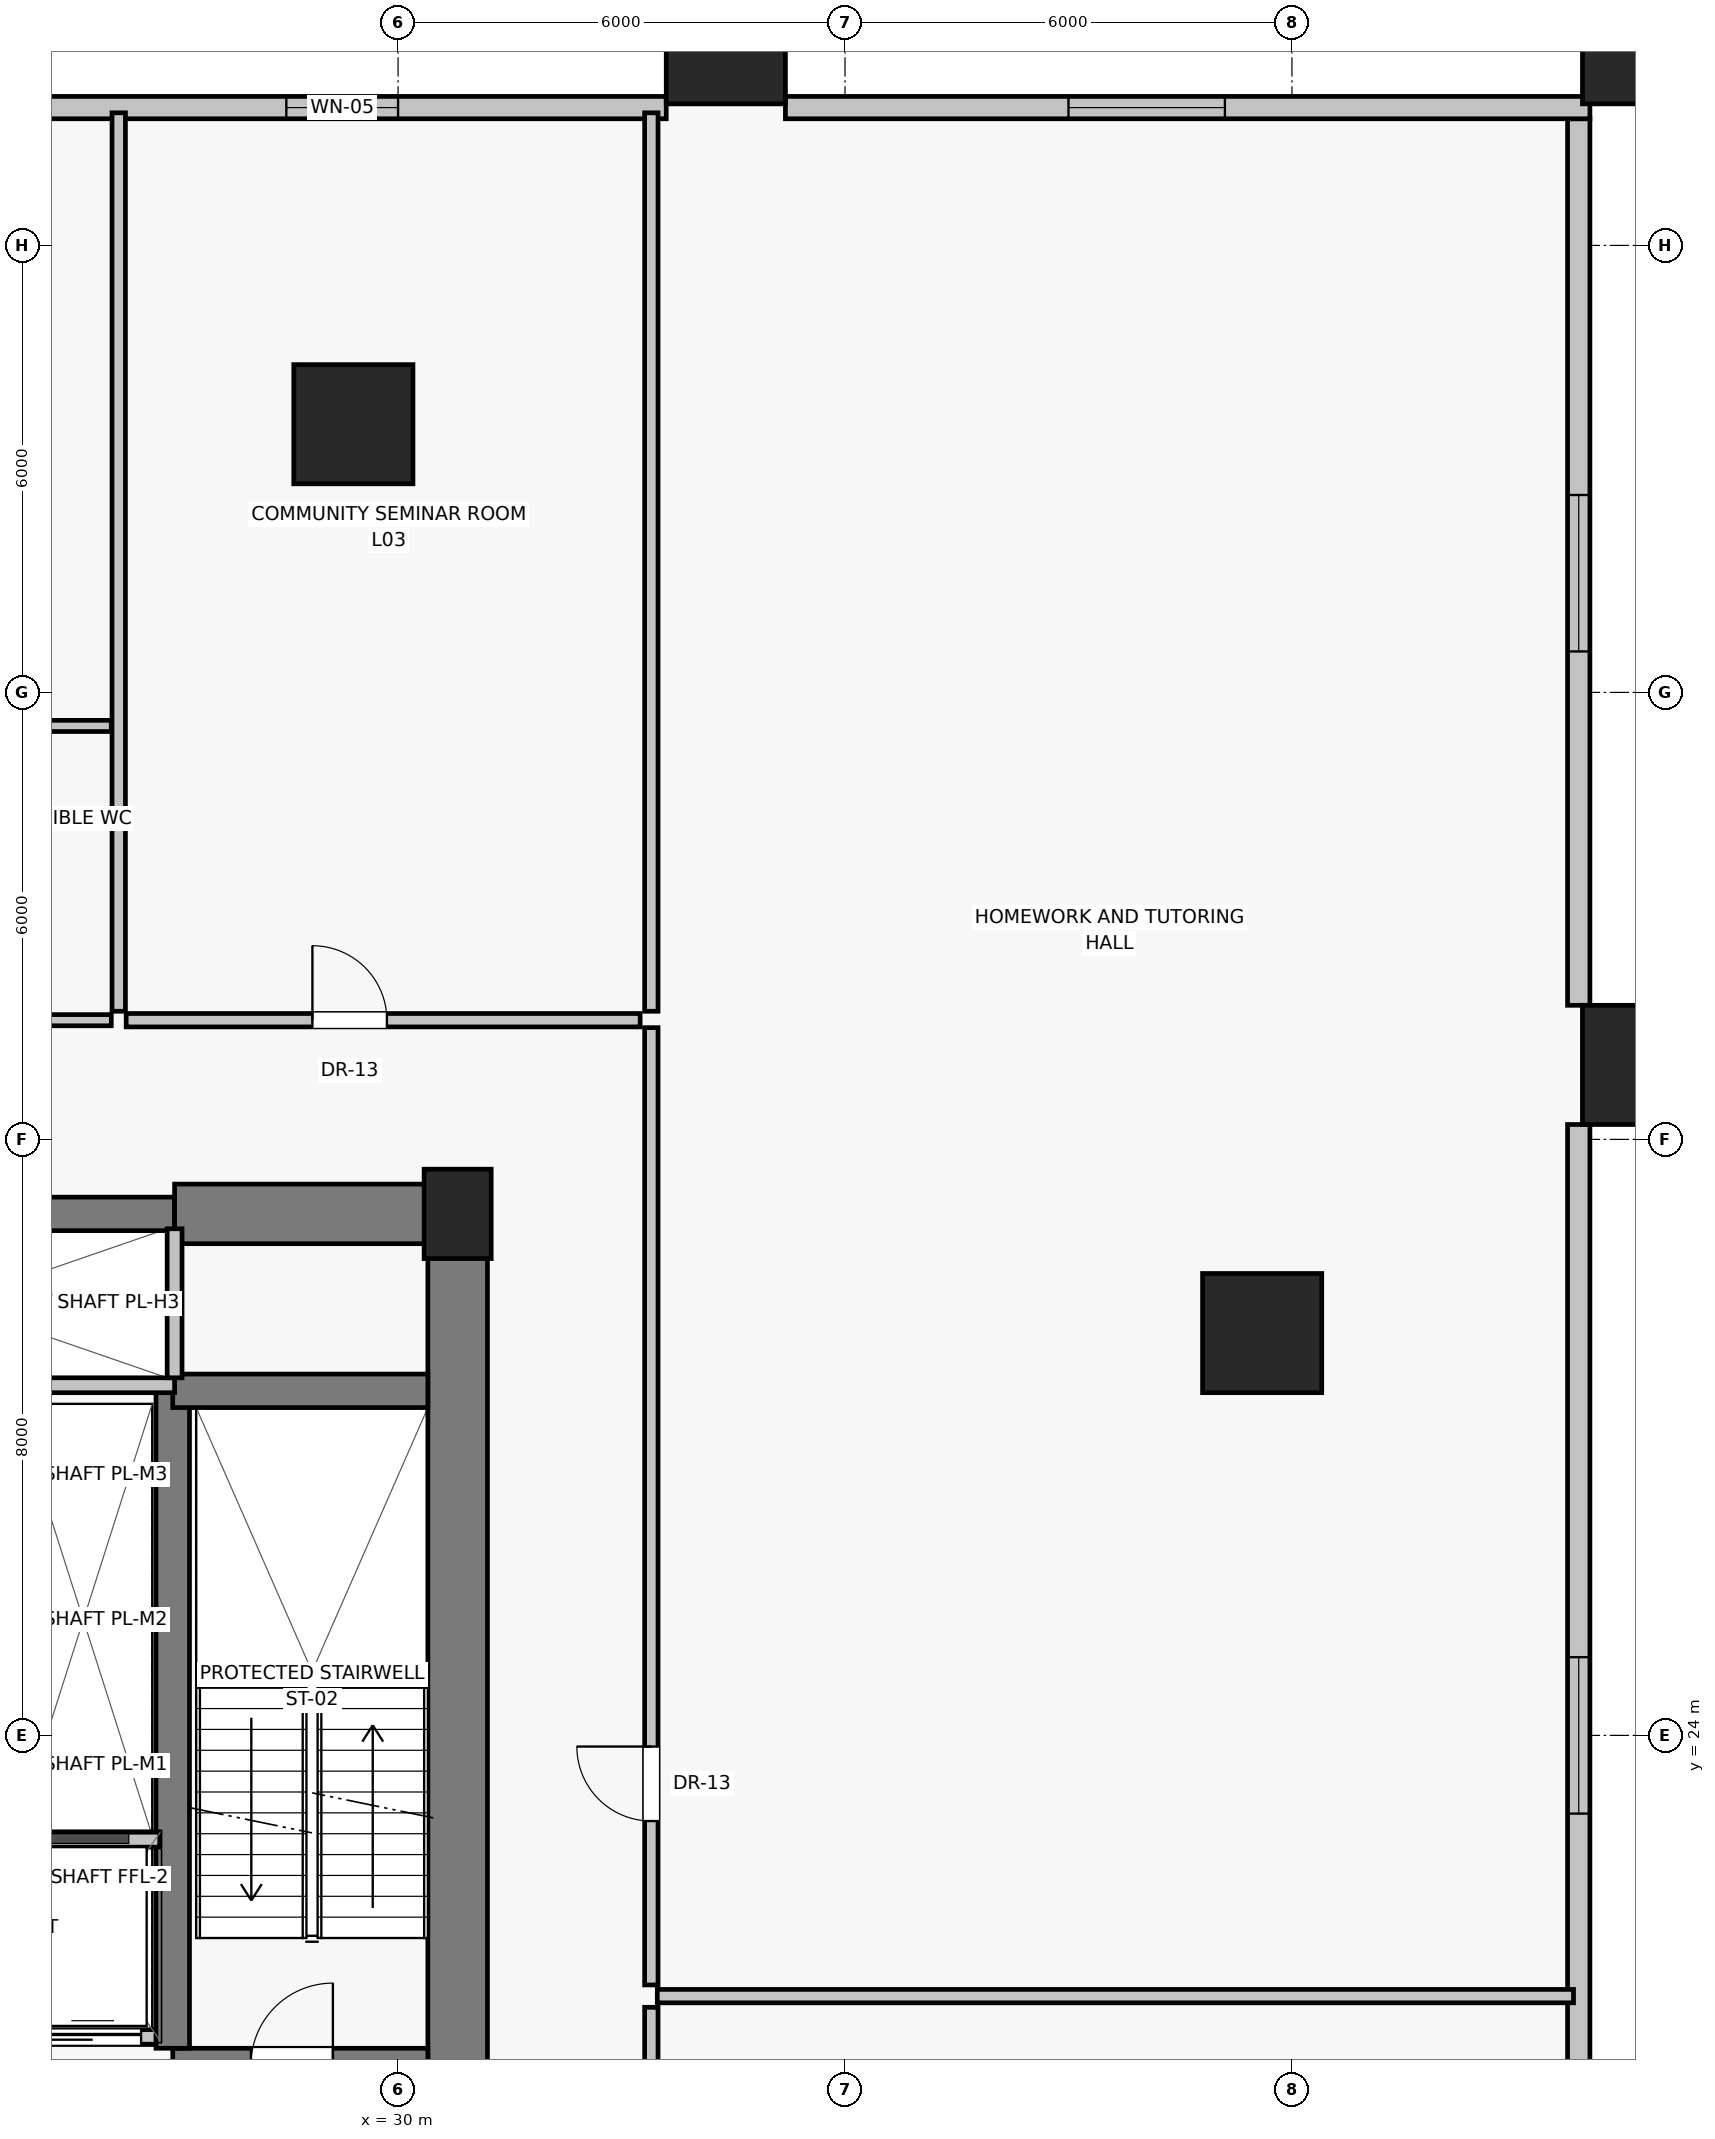
"""IFC4 building model, lengths in metres.
Left out: names, types, materials, properties, quantities, classifications, styles, units other than length and angle.
Written with IfcOpenShell. Run it as: python <this file> out.ifc"""

import sys

from ifc_helpers import new_model, si_unit, direction, frame, frame_2d, origin, origin_2d, place, context, subcontext, project, spatial, rectangle, extrude, source, transform, mapped, element, fill, save


model = new_model("IFC4")
c1 = context("Model", 3, precision=1e-05, world=origin(), true_north=direction((0.0, 1.0)))
c2 = subcontext(c1, "Body", "Model", "MODEL_VIEW")
j1 = project(units=[si_unit("LENGTHUNIT", "METRE"), si_unit("PLANEANGLEUNIT", "RADIAN")], contexts=[c1])
p1 = place(None, origin())
s1 = spatial("IfcSite", under=j1, at=p1, CompositionType="ELEMENT")
p2 = place(p1, origin())
s2 = spatial("IfcBuilding", under=s1, at=p2, CompositionType="ELEMENT")
p3 = place(p2, frame((0.0, 0.0, 14.0)))
s3 = spatial("IfcBuildingStorey", under=s2, at=p3, CompositionType="ELEMENT", Elevation=14.0)
p4 = place(p3, frame((30.8, 31.0, 0.0), z_axis=(0.0, 0.0, 1.0), x_axis=(1.0, 0.0, 0.0)))
e1 = element("IfcColumn", 1, at=p4, inside=s3, PredefinedType="PILASTER", context=c2, shape_type="SweptSolid", body=[
    extrude(rectangle(XDim=0.9, YDim=1.2, at=origin_2d()), origin(), (0.0, 0.0, 1.0), 4.4),
])
for number, where, z_axis, x_axis in (
    (2, (46.7, 33.0, 0.0), (0.0, 0.0, 1.0), (1.0, 0.0, 0.0)),
    (3, (34.4, 46.7, 0.0), (0.0, 0.0, 1.0), (1.0, 0.0, 0.0)),
    (4, (46.7, 46.7, 0.0), (0.0, 0.0, 1.0), (1.0, 0.0, 0.0)),
    (5, (41.6, 29.4, 0.0), (0.0, 0.0, 1.0), (1.0, 0.0, 0.0)),
    (6, (29.4, 41.6, 0.0), (0.0, 0.0, 1.0), (1.0, 0.0, 0.0)),
):
    element("IfcColumn", number, at=place(p3, frame(where, z_axis=z_axis, x_axis=x_axis)), inside=s3, PredefinedType="COLUMN", context=c2, shape_type="SweptSolid", body=[
        extrude(rectangle(XDim=1.6, YDim=1.6, at=origin_2d()), origin(), (0.0, 0.0, 1.0), 4.4),
    ])
p5 = place(p3, frame((45.85, 15.8, 0.0), z_axis=(0.0, 0.0, 1.0), x_axis=(0.0, 1.0, 0.0)))
e7 = element("IfcWall", 7, at=p5, inside=s3, PredefinedType="SOLIDWALL", context=c2, shape_type="SweptSolid", body=[
    extrude(rectangle(XDim=16.4, YDim=0.3, at=frame_2d((8.2, 0.0))), origin(), (0.0, 0.0, 1.0), 3.0),
])
p6 = place(p5, frame((7.15, 0.0, 0.85)))
e8 = element("IfcOpeningElement", 8, at=p6, cuts=e7, PredefinedType="OPENING", context=c2, shape_type="SweptSolid", body=[
    extrude(rectangle(XDim=2.1, YDim=1.75, at=frame_2d((1.05, 0.875))), frame((0.0, 0.16, 0.0), z_axis=(0.0, -1.0, 0.0), x_axis=(1.0, 0.0, 0.0)), (0.0, 0.0, 1.0), 0.32),
])
p7 = place(p3, frame((45.85, 33.8, 0.0), z_axis=(0.0, 0.0, 1.0), x_axis=(0.0, 1.0, 0.0)))
e9 = element("IfcWall", 9, at=p7, inside=s3, PredefinedType="SOLIDWALL", context=c2, shape_type="SweptSolid", body=[
    extrude(rectangle(XDim=11.9, YDim=0.3, at=frame_2d((5.95, 0.0))), origin(), (0.0, 0.0, 1.0), 3.0),
])
p8 = place(p7, frame((4.75, 0.0, 0.85)))
e10 = element("IfcOpeningElement", 10, at=p8, cuts=e9, PredefinedType="OPENING", context=c2, shape_type="SweptSolid", body=[
    extrude(rectangle(XDim=2.1, YDim=1.75, at=frame_2d((1.05, 0.875))), frame((0.0, 0.16, 0.0), z_axis=(0.0, -1.0, 0.0), x_axis=(1.0, 0.0, 0.0)), (0.0, 0.0, 1.0), 0.32),
])
p9 = place(p3, frame((46.0, 45.85, 0.0), z_axis=(0.0, 0.0, 1.0), x_axis=(-1.0, 0.0, 0.0)))
e11 = element("IfcWall", 11, at=p9, inside=s3, PredefinedType="SOLIDWALL", context=c2, shape_type="SweptSolid", body=[
    extrude(rectangle(XDim=10.8, YDim=0.3, at=frame_2d((5.4, 0.0))), origin(), (0.0, 0.0, 1.0), 3.0),
])
p10 = place(p9, frame((4.9, 0.0, 0.85)))
e12 = element("IfcOpeningElement", 12, at=p10, cuts=e11, PredefinedType="OPENING", context=c2, shape_type="SweptSolid", body=[
    extrude(rectangle(XDim=2.1, YDim=1.75, at=frame_2d((1.05, 0.875))), frame((0.0, 0.16, 0.0), z_axis=(0.0, -1.0, 0.0), x_axis=(1.0, 0.0, 0.0)), (0.0, 0.0, 1.0), 0.32),
])
p11 = place(p3, frame((33.6, 45.85, 0.0), z_axis=(0.0, 0.0, 1.0), x_axis=(-1.0, 0.0, 0.0)))
e13 = element("IfcWall", 13, at=p11, inside=s3, PredefinedType="SOLIDWALL", context=c2, shape_type="SweptSolid", body=[
    extrude(rectangle(XDim=8.8, YDim=0.3, at=frame_2d((4.4, 0.0))), origin(), (0.0, 0.0, 1.0), 3.0),
])
p12 = place(p11, frame((3.6, 0.0, 0.85)))
e14 = element("IfcOpeningElement", 14, at=p12, cuts=e13, PredefinedType="OPENING", context=c2, shape_type="SweptSolid", body=[
    extrude(rectangle(XDim=1.5, YDim=1.6, at=frame_2d((0.75, 0.8))), frame((0.0, 0.16, 0.0), z_axis=(0.0, -1.0, 0.0), x_axis=(1.0, 0.0, 0.0)), (0.0, 0.0, 1.0), 0.32),
])
p13 = place(p3, frame((30.8, 16.8, 0.0), z_axis=(0.0, 0.0, 1.0), x_axis=(0.0, 1.0, 0.0)))
e15 = element("IfcWall", 15, at=p13, inside=s3, PredefinedType="SHEAR", context=c2, shape_type="SweptSolid", body=[
    extrude(rectangle(XDim=14.2, YDim=0.8, at=frame_2d((7.1, 0.0))), origin(), (0.0, 0.0, 1.0), 4.1),
])
p14 = place(p3, frame((21.0, 31.0, 0.0), z_axis=(0.0, 0.0, 1.0), x_axis=(1.0, 0.0, 0.0)))
e16 = element("IfcWall", 16, at=p14, inside=s3, PredefinedType="SHEAR", context=c2, shape_type="SweptSolid", body=[
    extrude(rectangle(XDim=6.0, YDim=0.45, at=frame_2d((3.0, 0.0))), origin(), (0.0, 0.0, 1.0), 4.1),
])
p15 = place(p3, frame((27.0, 31.0, 0.0), z_axis=(0.0, 0.0, 1.0), x_axis=(1.0, 0.0, 0.0)))
e17 = element("IfcWall", 17, at=p15, inside=s3, PredefinedType="SHEAR", context=c2, shape_type="SweptSolid", body=[
    extrude(rectangle(XDim=3.8, YDim=0.8, at=frame_2d((1.9, 0.0))), origin(), (0.0, 0.0, 1.0), 4.1),
])
p16 = place(p3, frame((24.95, 19.95, 0.0), z_axis=(0.0, 0.0, 1.0), x_axis=(1.0, 0.0, 0.0)))
e18 = element("IfcWall", 18, at=p16, inside=s3, PredefinedType="SOLIDWALL", context=c2, shape_type="SweptSolid", body=[
    extrude(rectangle(XDim=1.85, YDim=0.2, at=frame_2d((0.925, 0.0))), origin(), (0.0, 0.0, 1.0), 4.1),
])
p17 = place(p16, frame((0.3, 0.0, 0.0)))
e19 = element("IfcOpeningElement", 19, at=p17, cuts=e18, PredefinedType="OPENING", context=c2, shape_type="SweptSolid", body=[
    extrude(rectangle(XDim=1.3, YDim=2.25, at=frame_2d((0.65, 1.125))), frame((0.0, 0.11, 0.0), z_axis=(0.0, -1.0, 0.0), x_axis=(1.0, 0.0, 0.0)), (0.0, 0.0, 1.0), 0.22),
])
p18 = place(p3, frame((26.975, 19.575, 0.0), z_axis=(0.0, 0.0, 1.0), x_axis=(1.0, 0.0, 0.0)))
e20 = element("IfcWall", 20, at=p18, inside=s3, PredefinedType="SHEAR", context=c2, shape_type="SweptSolid", body=[
    extrude(rectangle(XDim=3.425, YDim=0.45, at=frame_2d((1.712, 0.0))), origin(), (0.0, 0.0, 1.0), 4.1),
])
p19 = place(p18, frame((1.05, 0.0, 0.0)))
e21 = element("IfcOpeningElement", 21, at=p19, cuts=e20, PredefinedType="OPENING", context=c2, shape_type="SweptSolid", body=[
    extrude(rectangle(XDim=1.1, YDim=2.03, at=frame_2d((0.55, 1.015))), frame((0.0, 0.235, 0.0), z_axis=(0.0, -1.0, 0.0), x_axis=(1.0, 0.0, 0.0)), (0.0, 0.0, 1.0), 0.47),
])
p20 = place(p3, frame((26.975, 19.8, 0.0), z_axis=(0.0, 0.0, 1.0), x_axis=(0.0, 1.0, 0.0)))
e22 = element("IfcWall", 22, at=p20, inside=s3, PredefinedType="SHEAR", context=c2, shape_type="SweptSolid", body=[
    extrude(rectangle(XDim=8.825, YDim=0.45, at=frame_2d((4.413, 0.0))), origin(), (0.0, 0.0, 1.0), 4.1),
])
p21 = place(p3, frame((26.975, 28.625, 0.0), z_axis=(0.0, 0.0, 1.0), x_axis=(1.0, 0.0, 0.0)))
e23 = element("IfcWall", 23, at=p21, inside=s3, PredefinedType="SHEAR", context=c2, shape_type="SweptSolid", body=[
    extrude(rectangle(XDim=3.425, YDim=0.45, at=frame_2d((1.712, 0.0))), origin(), (0.0, 0.0, 1.0), 4.1),
])
p22 = place(p3, frame((24.85, 22.6, 0.0), z_axis=(0.0, 0.0, 1.0), x_axis=(1.0, 0.0, 0.0)))
e24 = element("IfcWall", 24, at=p22, inside=s3, PredefinedType="SOLIDWALL", context=c2, shape_type="SweptSolid", body=[
    extrude(rectangle(XDim=1.95, YDim=0.2, at=frame_2d((0.975, 0.0))), origin(), (0.0, 0.0, 1.0), 4.1),
])
p23 = place(p3, frame((21.0, 28.7, 0.0), z_axis=(0.0, 0.0, 1.0), x_axis=(1.0, 0.0, 0.0)))
e25 = element("IfcWall", 25, at=p23, inside=s3, PredefinedType="SOLIDWALL", context=c2, shape_type="SweptSolid", body=[
    extrude(rectangle(XDim=6.0, YDim=0.2, at=frame_2d((3.0, 0.0))), origin(), (0.0, 0.0, 1.0), 4.1),
])
p24 = place(p3, frame((27.0, 28.8, 0.0), z_axis=(0.0, 0.0, 1.0), x_axis=(0.0, 1.0, 0.0)))
e26 = element("IfcWall", 26, at=p24, inside=s3, PredefinedType="SOLIDWALL", context=c2, shape_type="SweptSolid", body=[
    extrude(rectangle(XDim=2.0, YDim=0.2, at=frame_2d((1.0, 0.0))), origin(), (0.0, 0.0, 1.0), 4.1),
])
p25 = place(p3, frame((33.4, 14.3, 0.0), z_axis=(0.0, 0.0, 1.0), x_axis=(0.0, 1.0, 0.0)))
e27 = element("IfcWall", 27, at=p25, inside=s3, PredefinedType="PARTITIONING", context=c2, shape_type="SweptSolid", body=[
    extrude(rectangle(XDim=6.05, YDim=0.18, at=frame_2d((3.025, 0.0))), origin(), (0.0, 0.0, 1.0), 4.1),
])
p26 = place(p25, frame((2.2, 0.0, 0.0)))
e28 = element("IfcOpeningElement", 28, at=p26, cuts=e27, PredefinedType="OPENING", context=c2, shape_type="SweptSolid", body=[
    extrude(rectangle(XDim=1.0, YDim=2.01, at=frame_2d((0.5, 1.005))), frame((0.0, 0.1, 0.0), z_axis=(0.0, -1.0, 0.0), x_axis=(1.0, 0.0, 0.0)), (0.0, 0.0, 1.0), 0.2),
])
p27 = place(p3, frame((33.4, 20.65, 0.0), z_axis=(0.0, 0.0, 1.0), x_axis=(0.0, 1.0, 0.0)))
e29 = element("IfcWall", 29, at=p27, inside=s3, PredefinedType="PARTITIONING", context=c2, shape_type="SweptSolid", body=[
    extrude(rectangle(XDim=12.85, YDim=0.18, at=frame_2d((6.425, 0.0))), origin(), (0.0, 0.0, 1.0), 4.1),
])
p28 = place(p27, frame((2.2, 0.0, 0.0)))
e30 = element("IfcOpeningElement", 30, at=p28, cuts=e29, PredefinedType="OPENING", context=c2, shape_type="SweptSolid", body=[
    extrude(rectangle(XDim=1.0, YDim=2.01, at=frame_2d((0.5, 1.005))), frame((0.0, 0.1, 0.0), z_axis=(0.0, -1.0, 0.0), x_axis=(1.0, 0.0, 0.0)), (0.0, 0.0, 1.0), 0.2),
])
p29 = place(p3, frame((33.48, 20.5, 0.0), z_axis=(0.0, 0.0, 1.0), x_axis=(1.0, 0.0, 0.0)))
e31 = element("IfcWall", 31, at=p29, inside=s3, PredefinedType="PARTITIONING", context=c2, shape_type="SweptSolid", body=[
    extrude(rectangle(XDim=12.3, YDim=0.18, at=frame_2d((6.15, 0.0))), origin(), (0.0, 0.0, 1.0), 4.1),
])
p30 = place(p3, frame((21.95, 33.6, 0.0), z_axis=(0.0, 0.0, 1.0), x_axis=(1.0, 0.0, 0.0)))
e32 = element("IfcWall", 32, at=p30, inside=s3, PredefinedType="PARTITIONING", context=c2, shape_type="SweptSolid", body=[
    extrude(rectangle(XDim=4.2, YDim=0.15, at=frame_2d((2.1, 0.0))), origin(), (0.0, 0.0, 1.0), 4.1),
])
p31 = place(p30, frame((1.5, 0.0, 0.0)))
e33 = element("IfcOpeningElement", 33, at=p31, cuts=e32, PredefinedType="OPENING", context=c2, shape_type="SweptSolid", body=[
    extrude(rectangle(XDim=1.0, YDim=2.01, at=frame_2d((0.5, 1.005))), frame((0.0, 0.085, 0.0), z_axis=(0.0, -1.0, 0.0), x_axis=(1.0, 0.0, 0.0)), (0.0, 0.0, 1.0), 0.17),
])
p32 = place(p3, frame((26.35, 33.6, 0.0), z_axis=(0.0, 0.0, 1.0), x_axis=(1.0, 0.0, 0.0)))
e34 = element("IfcWall", 34, at=p32, inside=s3, PredefinedType="PARTITIONING", context=c2, shape_type="SweptSolid", body=[
    extrude(rectangle(XDim=6.9, YDim=0.18, at=frame_2d((3.45, 0.0))), origin(), (0.0, 0.0, 1.0), 4.1),
])
p33 = place(p32, frame((2.5, 0.0, 0.0)))
e35 = element("IfcOpeningElement", 35, at=p33, cuts=e34, PredefinedType="OPENING", context=c2, shape_type="SweptSolid", body=[
    extrude(rectangle(XDim=1.0, YDim=2.01, at=frame_2d((0.5, 1.005))), frame((0.0, 0.1, 0.0), z_axis=(0.0, -1.0, 0.0), x_axis=(1.0, 0.0, 0.0)), (0.0, 0.0, 1.0), 0.2),
])
for number, where, z_axis, x_axis in (
    (36, (26.25, 33.72, 0.0), (0.0, 0.0, 1.0), (0.0, 1.0, 0.0)),
    (37, (33.4, 33.72, 0.0), (0.0, 0.0, 1.0), (0.0, 1.0, 0.0)),
):
    element("IfcWall", number, at=place(p3, frame(where, z_axis=z_axis, x_axis=x_axis)), inside=s3, PredefinedType="PARTITIONING", context=c2, shape_type="SweptSolid", body=[
        extrude(rectangle(XDim=12.06, YDim=0.18, at=frame_2d((6.03, 0.0))), origin(), (0.0, 0.0, 1.0), 4.1),
    ])
p34 = place(p3, frame((17.0, 37.55, 0.0), z_axis=(0.0, 0.0, 1.0), x_axis=(1.0, 0.0, 0.0)))
e38 = element("IfcWall", 38, at=p34, inside=s3, PredefinedType="PARTITIONING", context=c2, shape_type="SweptSolid", body=[
    extrude(rectangle(XDim=9.15, YDim=0.15, at=frame_2d((4.575, 0.0))), origin(), (0.0, 0.0, 1.0), 4.1),
])
m1 = source(origin(), c2, "Body", "SweptSolid", [
    extrude(rectangle(XDim=2.1, YDim=1.75, at=frame_2d((1.05, 0.875))), frame((0.0, 0.03, 0.0), z_axis=(0.0, -1.0, 0.0), x_axis=(1.0, 0.0, 0.0)), (0.0, 0.0, 1.0), 0.06),
])
p35 = place(p6, origin())
e39 = element("IfcWindow", 39, at=p35, inside=s3, PartitioningType="DOUBLE_PANEL_VERTICAL", PredefinedType="WINDOW", context=c2, shape_type="MappedRepresentation", body=[
    mapped(m1, transform((0.0, 0.0, 0.0), scale=1.0)),
])
fill(e8, e39)
p36 = place(p8, origin())
e40 = element("IfcWindow", 40, at=p36, inside=s3, PartitioningType="DOUBLE_PANEL_VERTICAL", PredefinedType="WINDOW", context=c2, shape_type="MappedRepresentation", body=[
    mapped(m1, transform((0.0, 0.0, 0.0), scale=1.0)),
])
fill(e10, e40)
p37 = place(p10, origin())
e41 = element("IfcWindow", 41, at=p37, inside=s3, PartitioningType="DOUBLE_PANEL_VERTICAL", PredefinedType="WINDOW", context=c2, shape_type="MappedRepresentation", body=[
    mapped(m1, transform((0.0, 0.0, 0.0), scale=1.0)),
])
fill(e12, e41)
m2 = source(origin(), c2, "Body", "SweptSolid", [
    extrude(rectangle(XDim=1.5, YDim=1.6, at=frame_2d((0.75, 0.8))), frame((0.0, 0.03, 0.0), z_axis=(0.0, -1.0, 0.0), x_axis=(1.0, 0.0, 0.0)), (0.0, 0.0, 1.0), 0.06),
])
p38 = place(p12, origin())
e42 = element("IfcWindow", 42, at=p38, inside=s3, PartitioningType="DOUBLE_PANEL_VERTICAL", PredefinedType="WINDOW", context=c2, shape_type="MappedRepresentation", body=[
    mapped(m2, transform((0.0, 0.0, 0.0), scale=1.0)),
])
fill(e14, e42)
m3 = source(origin(), c2, "Body", "SweptSolid", [
    extrude(rectangle(XDim=1.3, YDim=2.25, at=frame_2d((0.65, 1.125))), frame((0.0, 0.025, 0.0), z_axis=(0.0, -1.0, 0.0), x_axis=(1.0, 0.0, 0.0)), (0.0, 0.0, 1.0), 0.05),
])
p39 = place(p17, origin())
e43 = element("IfcDoor", 43, at=p39, inside=s3, OperationType="SLIDING_TO_LEFT", PredefinedType="DOOR", context=c2, shape_type="MappedRepresentation", body=[
    mapped(m3, transform((0.0, 0.0, 0.0), scale=1.0)),
])
fill(e19, e43)
m4 = source(origin(), c2, "Body", "SweptSolid", [
    extrude(rectangle(XDim=1.0, YDim=2.01, at=frame_2d((0.5, 1.005))), frame((0.0, 0.025, 0.0), z_axis=(0.0, -1.0, 0.0), x_axis=(1.0, 0.0, 0.0)), (0.0, 0.0, 1.0), 0.05),
])
p40 = place(p28, origin())
e44 = element("IfcDoor", 44, at=p40, inside=s3, OperationType="SINGLE_SWING_RIGHT", PredefinedType="DOOR", context=c2, shape_type="MappedRepresentation", body=[
    mapped(m4, transform((0.0, 0.0, 0.0), scale=1.0)),
])
fill(e30, e44)
p41 = place(p33, origin())
e45 = element("IfcDoor", 45, at=p41, inside=s3, OperationType="SINGLE_SWING_LEFT", PredefinedType="DOOR", context=c2, shape_type="MappedRepresentation", body=[
    mapped(m4, transform((0.0, 0.0, 0.0), scale=1.0)),
])
fill(e35, e45)
save(model, sys.argv[1])
